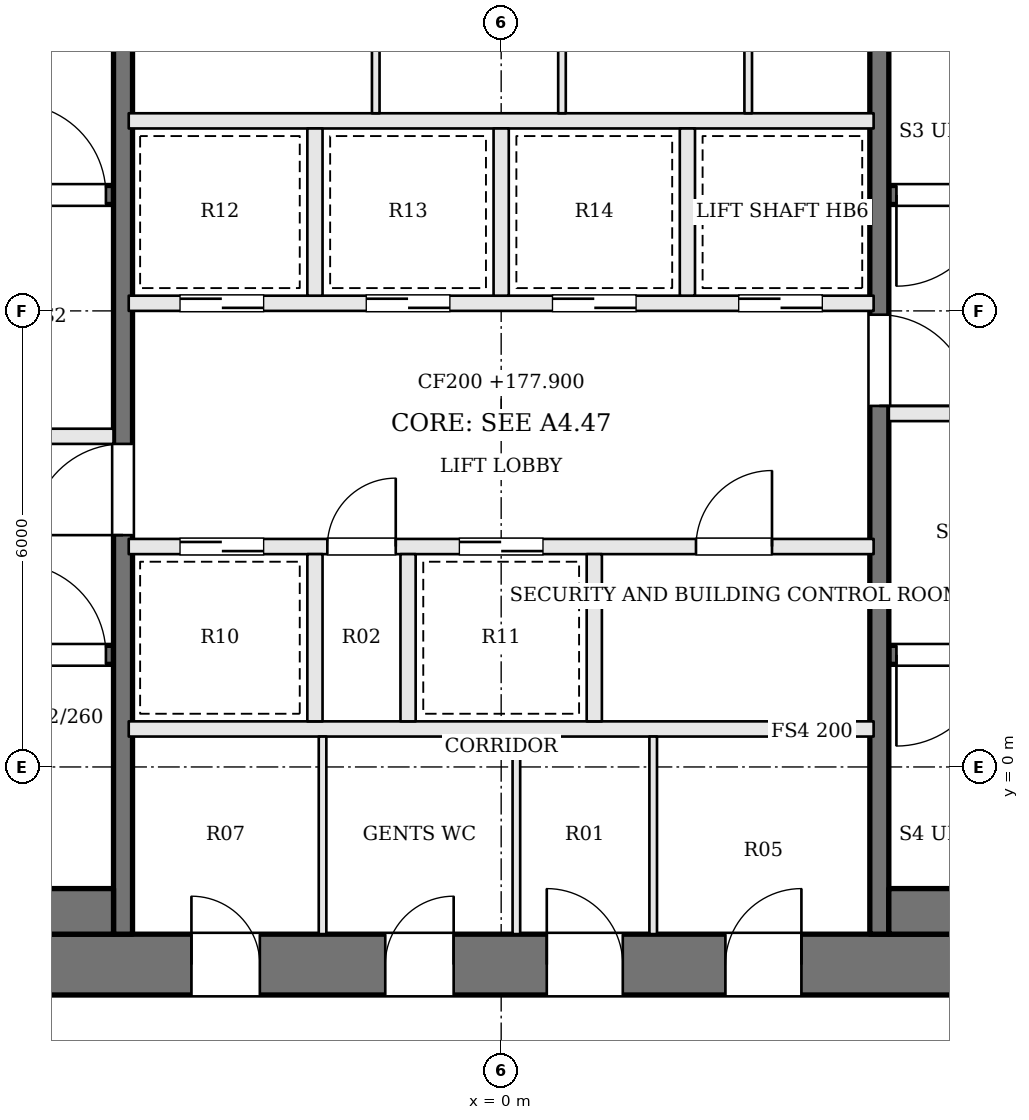
"""IFC4 building model, lengths in metres.
Left out: names, types, materials, properties, quantities, classifications, styles, units other than length and angle.
Written with IfcOpenShell. Run it as: python <this file> out.ifc"""

import sys

from ifc_helpers import new_model, si_unit, direction, frame, frame_2d, origin, place, context, subcontext, project, spatial, rectangle, extrude, element, fill, save


model = new_model("IFC4")
c1 = context("Model", 3, precision=1e-05, world=origin(), true_north=direction((0.0, 1.0)))
c2 = subcontext(c1, "Body", "Model", "MODEL_VIEW")
j1 = project(units=[si_unit("LENGTHUNIT", "METRE"), si_unit("PLANEANGLEUNIT", "RADIAN")], contexts=[c1])
p1 = place(None, origin())
s1 = spatial("IfcSite", under=j1, at=p1, CompositionType="ELEMENT")
p2 = place(p1, origin())
s2 = spatial("IfcBuilding", under=s1, at=p2, CompositionType="ELEMENT")
p3 = place(p2, frame((0.0, 0.0, 177.9)))
s3 = spatial("IfcBuildingStorey", under=s2, at=p3, CompositionType="ELEMENT", Elevation=177.9)
p4 = place(p3, frame((-13.0, -2.6, 0.0), z_axis=(0.0, 0.0, 1.0), x_axis=(1.0, 0.0, 0.0)))
e1 = element("IfcWall", 1, at=p4, inside=s3, PredefinedType="SHEAR", context=c2, shape_type="SweptSolid", body=[
    extrude(rectangle(XDim=26.0, YDim=0.8, at=frame_2d((13.0, 0.0))), origin(), (0.0, 0.0, 1.0), 3.9),
])
p5 = place(p4, frame((8.925, 0.0, 0.0)))
e2 = element("IfcOpeningElement", 2, at=p5, cuts=e1, PredefinedType="OPENING", context=c2, shape_type="SweptSolid", body=[
    extrude(rectangle(XDim=0.9, YDim=2.1, at=frame_2d((0.45, 1.05))), frame((0.0, 0.41, 0.0), z_axis=(0.0, -1.0, 0.0), x_axis=(1.0, 0.0, 0.0)), (0.0, 0.0, 1.0), 0.82),
])
p6 = place(p4, frame((11.475, 0.0, 0.0)))
e3 = element("IfcOpeningElement", 3, at=p6, cuts=e1, PredefinedType="OPENING", context=c2, shape_type="SweptSolid", body=[
    extrude(rectangle(XDim=0.9, YDim=2.1, at=frame_2d((0.45, 1.05))), frame((0.0, 0.41, 0.0), z_axis=(0.0, -1.0, 0.0), x_axis=(1.0, 0.0, 0.0)), (0.0, 0.0, 1.0), 0.82),
])
p7 = place(p4, frame((13.6, 0.0, 0.0)))
e4 = element("IfcOpeningElement", 4, at=p7, cuts=e1, PredefinedType="OPENING", context=c2, shape_type="SweptSolid", body=[
    extrude(rectangle(XDim=1.0, YDim=2.1, at=frame_2d((0.5, 1.05))), frame((0.0, 0.41, 0.0), z_axis=(0.0, -1.0, 0.0), x_axis=(1.0, 0.0, 0.0)), (0.0, 0.0, 1.0), 0.82),
])
p8 = place(p4, frame((15.95, 0.0, 0.0)))
e5 = element("IfcOpeningElement", 5, at=p8, cuts=e1, PredefinedType="OPENING", context=c2, shape_type="SweptSolid", body=[
    extrude(rectangle(XDim=1.0, YDim=2.1, at=frame_2d((0.5, 1.05))), frame((0.0, 0.41, 0.0), z_axis=(0.0, -1.0, 0.0), x_axis=(1.0, 0.0, 0.0)), (0.0, 0.0, 1.0), 0.82),
])
p9 = place(p3, frame((-12.2, 1.475, 0.0), z_axis=(0.0, 0.0, 1.0), x_axis=(1.0, 0.0, 0.0)))
e6 = element("IfcWall", 6, at=p9, inside=s3, PredefinedType="SOLIDWALL", context=c2, shape_type="SweptSolid", body=[
    extrude(rectangle(XDim=7.1, YDim=0.25, at=frame_2d((3.55, 0.0))), origin(), (0.0, 0.0, 1.0), 3.7),
])
p10 = place(p9, frame((5.8, 0.0, 0.0)))
e7 = element("IfcOpeningElement", 7, at=p10, cuts=e6, PredefinedType="OPENING", context=c2, shape_type="SweptSolid", body=[
    extrude(rectangle(XDim=1.2, YDim=2.1, at=frame_2d((0.6, 1.05))), frame((0.0, 0.135, 0.0), z_axis=(0.0, -1.0, 0.0), x_axis=(1.0, 0.0, 0.0)), (0.0, 0.0, 1.0), 0.27),
])
p11 = place(p3, frame((12.2, 7.525, 0.0), z_axis=(0.0, 0.0, 1.0), x_axis=(-1.0, 0.0, 0.0)))
e8 = element("IfcWall", 8, at=p11, inside=s3, PredefinedType="SOLIDWALL", context=c2, shape_type="SweptSolid", body=[
    extrude(rectangle(XDim=7.1, YDim=0.25, at=frame_2d((3.55, 0.0))), origin(), (0.0, 0.0, 1.0), 3.7),
])
p12 = place(p11, frame((5.8, 0.0, 0.0)))
e9 = element("IfcOpeningElement", 9, at=p12, cuts=e8, PredefinedType="OPENING", context=c2, shape_type="SweptSolid", body=[
    extrude(rectangle(XDim=1.2, YDim=2.1, at=frame_2d((0.6, 1.05))), frame((0.0, 0.135, 0.0), z_axis=(0.0, -1.0, 0.0), x_axis=(1.0, 0.0, 0.0)), (0.0, 0.0, 1.0), 0.27),
])
p13 = place(p3, frame((-12.2, 4.35, 0.0), z_axis=(0.0, 0.0, 1.0), x_axis=(1.0, 0.0, 0.0)))
e10 = element("IfcWall", 10, at=p13, inside=s3, PredefinedType="SOLIDWALL", context=c2, shape_type="SweptSolid", body=[
    extrude(rectangle(XDim=7.1, YDim=0.2, at=frame_2d((3.55, 0.0))), origin(), (0.0, 0.0, 1.0), 3.7),
])
p14 = place(p13, frame((4.4, 0.0, 0.0)))
e11 = element("IfcOpeningElement", 11, at=p14, cuts=e10, PredefinedType="OPENING", context=c2, shape_type="SweptSolid", body=[
    extrude(rectangle(XDim=1.2, YDim=2.1, at=frame_2d((0.6, 1.05))), frame((0.0, 0.11, 0.0), z_axis=(0.0, -1.0, 0.0), x_axis=(1.0, 0.0, 0.0)), (0.0, 0.0, 1.0), 0.22),
])
p15 = place(p13, frame((1.1, 0.0, 0.0)))
e12 = element("IfcOpeningElement", 12, at=p15, cuts=e10, PredefinedType="OPENING", context=c2, shape_type="SweptSolid", body=[
    extrude(rectangle(XDim=1.2, YDim=2.1, at=frame_2d((0.6, 1.05))), frame((0.0, 0.11, 0.0), z_axis=(0.0, -1.0, 0.0), x_axis=(1.0, 0.0, 0.0)), (0.0, 0.0, 1.0), 0.22),
])
p16 = place(p3, frame((12.2, 4.65, 0.0), z_axis=(0.0, 0.0, 1.0), x_axis=(-1.0, 0.0, 0.0)))
e13 = element("IfcWall", 13, at=p16, inside=s3, PredefinedType="SOLIDWALL", context=c2, shape_type="SweptSolid", body=[
    extrude(rectangle(XDim=7.1, YDim=0.2, at=frame_2d((3.55, 0.0))), origin(), (0.0, 0.0, 1.0), 3.7),
])
p17 = place(p16, frame((4.4, 0.0, 0.0)))
e14 = element("IfcOpeningElement", 14, at=p17, cuts=e13, PredefinedType="OPENING", context=c2, shape_type="SweptSolid", body=[
    extrude(rectangle(XDim=1.2, YDim=2.1, at=frame_2d((0.6, 1.05))), frame((0.0, 0.11, 0.0), z_axis=(0.0, -1.0, 0.0), x_axis=(1.0, 0.0, 0.0)), (0.0, 0.0, 1.0), 0.22),
])
p18 = place(p16, frame((1.1, 0.0, 0.0)))
e15 = element("IfcOpeningElement", 15, at=p18, cuts=e13, PredefinedType="OPENING", context=c2, shape_type="SweptSolid", body=[
    extrude(rectangle(XDim=1.2, YDim=2.1, at=frame_2d((0.6, 1.05))), frame((0.0, 0.11, 0.0), z_axis=(0.0, -1.0, 0.0), x_axis=(1.0, 0.0, 0.0)), (0.0, 0.0, 1.0), 0.22),
])
p19 = place(p3, frame((-12.2, 7.525, 0.0), z_axis=(0.0, 0.0, 1.0), x_axis=(1.0, 0.0, 0.0)))
e16 = element("IfcWall", 16, at=p19, inside=s3, PredefinedType="SOLIDWALL", context=c2, shape_type="SweptSolid", body=[
    extrude(rectangle(XDim=7.1, YDim=0.25, at=frame_2d((3.55, 0.0))), origin(), (0.0, 0.0, 1.0), 3.7),
])
p20 = place(p19, frame((5.8, 0.0, 0.0)))
e17 = element("IfcOpeningElement", 17, at=p20, cuts=e16, PredefinedType="OPENING", context=c2, shape_type="SweptSolid", body=[
    extrude(rectangle(XDim=1.2, YDim=2.1, at=frame_2d((0.6, 1.05))), frame((0.0, 0.135, 0.0), z_axis=(0.0, -1.0, 0.0), x_axis=(1.0, 0.0, 0.0)), (0.0, 0.0, 1.0), 0.27),
])
p21 = place(p3, frame((12.2, 1.475, 0.0), z_axis=(0.0, 0.0, 1.0), x_axis=(-1.0, 0.0, 0.0)))
e18 = element("IfcWall", 18, at=p21, inside=s3, PredefinedType="SOLIDWALL", context=c2, shape_type="SweptSolid", body=[
    extrude(rectangle(XDim=7.1, YDim=0.25, at=frame_2d((3.55, 0.0))), origin(), (0.0, 0.0, 1.0), 3.7),
])
p22 = place(p21, frame((5.8, 0.0, 0.0)))
e19 = element("IfcOpeningElement", 19, at=p22, cuts=e18, PredefinedType="OPENING", context=c2, shape_type="SweptSolid", body=[
    extrude(rectangle(XDim=1.2, YDim=2.1, at=frame_2d((0.6, 1.05))), frame((0.0, 0.135, 0.0), z_axis=(0.0, -1.0, 0.0), x_axis=(1.0, 0.0, 0.0)), (0.0, 0.0, 1.0), 0.27),
])
p23 = place(p3, frame((-4.975, -2.2, 0.0), z_axis=(0.0, 0.0, 1.0), x_axis=(0.0, 1.0, 0.0)))
e20 = element("IfcWall", 20, at=p23, inside=s3, PredefinedType="SOLIDWALL", context=c2, shape_type="SweptSolid", body=[
    extrude(rectangle(XDim=13.4, YDim=0.25, at=frame_2d((6.7, 0.0))), origin(), (0.0, 0.0, 1.0), 3.7),
])
p24 = place(p23, frame((5.25, 0.0, 0.0)))
e21 = element("IfcOpeningElement", 21, at=p24, cuts=e20, PredefinedType="OPENING", context=c2, shape_type="SweptSolid", body=[
    extrude(rectangle(XDim=1.2, YDim=2.1, at=frame_2d((0.6, 1.05))), frame((0.0, 0.135, 0.0), z_axis=(0.0, -1.0, 0.0), x_axis=(1.0, 0.0, 0.0)), (0.0, 0.0, 1.0), 0.27),
])
p25 = place(p3, frame((4.975, 11.2, 0.0), z_axis=(0.0, 0.0, 1.0), x_axis=(0.0, -1.0, 0.0)))
e22 = element("IfcWall", 22, at=p25, inside=s3, PredefinedType="SOLIDWALL", context=c2, shape_type="SweptSolid", body=[
    extrude(rectangle(XDim=13.4, YDim=0.25, at=frame_2d((6.7, 0.0))), origin(), (0.0, 0.0, 1.0), 3.7),
])
p26 = place(p25, frame((5.25, 0.0, 0.0)))
e23 = element("IfcOpeningElement", 23, at=p26, cuts=e22, PredefinedType="OPENING", context=c2, shape_type="SweptSolid", body=[
    extrude(rectangle(XDim=1.2, YDim=2.1, at=frame_2d((0.6, 1.05))), frame((0.0, 0.135, 0.0), z_axis=(0.0, -1.0, 0.0), x_axis=(1.0, 0.0, 0.0)), (0.0, 0.0, 1.0), 0.27),
])
for number, where, z_axis, x_axis in (
    (24, (-12.2, -1.9, 0.0), (0.0, 0.0, 1.0), (1.0, 0.0, 0.0)),
    (25, (12.2, -1.9, 0.0), (0.0, 0.0, 1.0), (-1.0, 0.0, 0.0)),
):
    element("IfcWall", number, at=place(p3, frame(where, z_axis=z_axis, x_axis=x_axis)), inside=s3, PredefinedType="SOLIDWALL", context=c2, shape_type="SweptSolid", body=[
        extrude(rectangle(XDim=7.1, YDim=0.6, at=frame_2d((3.55, 0.0))), origin(), (0.0, 0.0, 1.0), 3.7),
    ])
p27 = place(p3, frame((-4.9, 0.5, 0.0), z_axis=(0.0, 0.0, 1.0), x_axis=(1.0, 0.0, 0.0)))
e26 = element("IfcWall", 26, at=p27, inside=s3, PredefinedType="SOLIDWALL", context=c2, shape_type="SweptSolid", body=[
    extrude(rectangle(XDim=9.8, YDim=0.2, at=frame_2d((4.9, 0.0))), origin(), (0.0, 0.0, 1.0), 3.7),
])
p28 = place(p3, frame((-4.9, 2.9, 0.0), z_axis=(0.0, 0.0, 1.0), x_axis=(1.0, 0.0, 0.0)))
e27 = element("IfcWall", 27, at=p28, inside=s3, PredefinedType="SOLIDWALL", context=c2, shape_type="SweptSolid", body=[
    extrude(rectangle(XDim=9.8, YDim=0.2, at=frame_2d((4.9, 0.0))), origin(), (0.0, 0.0, 1.0), 3.7),
])
p29 = place(p28, frame((0.675, 0.0, 0.0)))
e28 = element("IfcOpeningElement", 28, at=p29, cuts=e27, PredefinedType="OPENING", context=c2, shape_type="SweptSolid", body=[
    extrude(rectangle(XDim=1.1, YDim=2.1, at=frame_2d((0.55, 1.05))), frame((0.0, 0.11, 0.0), z_axis=(0.0, -1.0, 0.0), x_axis=(1.0, 0.0, 0.0)), (0.0, 0.0, 1.0), 0.22),
])
p30 = place(p28, frame((2.613, 0.0, 0.0)))
e29 = element("IfcOpeningElement", 29, at=p30, cuts=e27, PredefinedType="OPENING", context=c2, shape_type="SweptSolid", body=[
    extrude(rectangle(XDim=0.9, YDim=2.1, at=frame_2d((0.45, 1.05))), frame((0.0, 0.11, 0.0), z_axis=(0.0, -1.0, 0.0), x_axis=(1.0, 0.0, 0.0)), (0.0, 0.0, 1.0), 0.22),
])
p31 = place(p28, frame((4.35, 0.0, 0.0)))
e30 = element("IfcOpeningElement", 30, at=p31, cuts=e27, PredefinedType="OPENING", context=c2, shape_type="SweptSolid", body=[
    extrude(rectangle(XDim=1.1, YDim=2.1, at=frame_2d((0.55, 1.05))), frame((0.0, 0.11, 0.0), z_axis=(0.0, -1.0, 0.0), x_axis=(1.0, 0.0, 0.0)), (0.0, 0.0, 1.0), 0.22),
])
p32 = place(p28, frame((7.463, 0.0, 0.0)))
e31 = element("IfcOpeningElement", 31, at=p32, cuts=e27, PredefinedType="OPENING", context=c2, shape_type="SweptSolid", body=[
    extrude(rectangle(XDim=1.0, YDim=2.1, at=frame_2d((0.5, 1.05))), frame((0.0, 0.11, 0.0), z_axis=(0.0, -1.0, 0.0), x_axis=(1.0, 0.0, 0.0)), (0.0, 0.0, 1.0), 0.22),
])
p33 = place(p3, frame((-4.9, 6.1, 0.0), z_axis=(0.0, 0.0, 1.0), x_axis=(1.0, 0.0, 0.0)))
e32 = element("IfcWall", 32, at=p33, inside=s3, PredefinedType="SOLIDWALL", context=c2, shape_type="SweptSolid", body=[
    extrude(rectangle(XDim=9.8, YDim=0.2, at=frame_2d((4.9, 0.0))), origin(), (0.0, 0.0, 1.0), 3.7),
])
p34 = place(p33, frame((0.675, 0.0, 0.0)))
e33 = element("IfcOpeningElement", 33, at=p34, cuts=e32, PredefinedType="OPENING", context=c2, shape_type="SweptSolid", body=[
    extrude(rectangle(XDim=1.1, YDim=2.1, at=frame_2d((0.55, 1.05))), frame((0.0, 0.11, 0.0), z_axis=(0.0, -1.0, 0.0), x_axis=(1.0, 0.0, 0.0)), (0.0, 0.0, 1.0), 0.22),
])
p35 = place(p33, frame((3.125, 0.0, 0.0)))
e34 = element("IfcOpeningElement", 34, at=p35, cuts=e32, PredefinedType="OPENING", context=c2, shape_type="SweptSolid", body=[
    extrude(rectangle(XDim=1.1, YDim=2.1, at=frame_2d((0.55, 1.05))), frame((0.0, 0.11, 0.0), z_axis=(0.0, -1.0, 0.0), x_axis=(1.0, 0.0, 0.0)), (0.0, 0.0, 1.0), 0.22),
])
p36 = place(p33, frame((5.575, 0.0, 0.0)))
e35 = element("IfcOpeningElement", 35, at=p36, cuts=e32, PredefinedType="OPENING", context=c2, shape_type="SweptSolid", body=[
    extrude(rectangle(XDim=1.1, YDim=2.1, at=frame_2d((0.55, 1.05))), frame((0.0, 0.11, 0.0), z_axis=(0.0, -1.0, 0.0), x_axis=(1.0, 0.0, 0.0)), (0.0, 0.0, 1.0), 0.22),
])
p37 = place(p33, frame((8.025, 0.0, 0.0)))
e36 = element("IfcOpeningElement", 36, at=p37, cuts=e32, PredefinedType="OPENING", context=c2, shape_type="SweptSolid", body=[
    extrude(rectangle(XDim=1.1, YDim=2.1, at=frame_2d((0.55, 1.05))), frame((0.0, 0.11, 0.0), z_axis=(0.0, -1.0, 0.0), x_axis=(1.0, 0.0, 0.0)), (0.0, 0.0, 1.0), 0.22),
])
p38 = place(p3, frame((-4.9, 8.5, 0.0), z_axis=(0.0, 0.0, 1.0), x_axis=(1.0, 0.0, 0.0)))
e37 = element("IfcWall", 37, at=p38, inside=s3, PredefinedType="SOLIDWALL", context=c2, shape_type="SweptSolid", body=[
    extrude(rectangle(XDim=9.8, YDim=0.2, at=frame_2d((4.9, 0.0))), origin(), (0.0, 0.0, 1.0), 3.7),
])
for number, where, z_axis, x_axis in (
    (38, (-2.45, 0.6, 0.0), (0.0, 0.0, 1.0), (0.0, 1.0, 0.0)),
    (39, (-1.225, 0.6, 0.0), (0.0, 0.0, 1.0), (0.0, 1.0, 0.0)),
    (40, (1.225, 0.6, 0.0), (0.0, 0.0, 1.0), (0.0, 1.0, 0.0)),
    (41, (-2.45, 6.2, 0.0), (0.0, 0.0, 1.0), (0.0, 1.0, 0.0)),
    (42, (0.0, 6.2, 0.0), (0.0, 0.0, 1.0), (0.0, 1.0, 0.0)),
    (43, (2.45, 6.2, 0.0), (0.0, 0.0, 1.0), (0.0, 1.0, 0.0)),
):
    element("IfcWall", number, at=place(p3, frame(where, z_axis=z_axis, x_axis=x_axis)), inside=s3, PredefinedType="SOLIDWALL", context=c2, shape_type="SweptSolid", body=[
        extrude(rectangle(XDim=2.2, YDim=0.2, at=frame_2d((1.1, 0.0))), origin(), (0.0, 0.0, 1.0), 3.7),
    ])
for number, where, z_axis, x_axis in (
    (44, (-2.35, -2.2, 0.0), (0.0, 0.0, 1.0), (0.0, 1.0, 0.0)),
    (45, (0.2, -2.2, 0.0), (0.0, 0.0, 1.0), (0.0, 1.0, 0.0)),
    (46, (2.0, -2.2, 0.0), (0.0, 0.0, 1.0), (0.0, 1.0, 0.0)),
    (47, (-1.65, 8.6, 0.0), (0.0, 0.0, 1.0), (0.0, 1.0, 0.0)),
    (48, (0.8, 8.6, 0.0), (0.0, 0.0, 1.0), (0.0, 1.0, 0.0)),
    (49, (3.25, 8.6, 0.0), (0.0, 0.0, 1.0), (0.0, 1.0, 0.0)),
):
    element("IfcWall", number, at=place(p3, frame(where, z_axis=z_axis, x_axis=x_axis)), inside=s3, PredefinedType="PARTITIONING", context=c2, shape_type="SweptSolid", body=[
        extrude(rectangle(XDim=2.6, YDim=0.1, at=frame_2d((1.3, 0.0))), origin(), (0.0, 0.0, 1.0), 3.7),
    ])
p39 = place(p24, origin())
e50 = element("IfcDoor", 50, at=p39, inside=s3, OperationType="SINGLE_SWING_LEFT", PredefinedType="DOOR", context=c2, shape_type="SweptSolid", body=[
    extrude(rectangle(XDim=1.2, YDim=2.1, at=frame_2d((0.6, 1.05))), frame((0.0, 0.025, 0.0), z_axis=(0.0, -1.0, 0.0), x_axis=(1.0, 0.0, 0.0)), (0.0, 0.0, 1.0), 0.05),
])
fill(e21, e50)
p40 = place(p26, origin())
e51 = element("IfcDoor", 51, at=p40, inside=s3, OperationType="SINGLE_SWING_RIGHT", PredefinedType="DOOR", context=c2, shape_type="SweptSolid", body=[
    extrude(rectangle(XDim=1.2, YDim=2.1, at=frame_2d((0.6, 1.05))), frame((0.0, 0.025, 0.0), z_axis=(0.0, -1.0, 0.0), x_axis=(1.0, 0.0, 0.0)), (0.0, 0.0, 1.0), 0.05),
])
fill(e23, e51)
p41 = place(p10, origin())
e52 = element("IfcDoor", 52, at=p41, inside=s3, OperationType="SINGLE_SWING_LEFT", PredefinedType="DOOR", context=c2, shape_type="SweptSolid", body=[
    extrude(rectangle(XDim=1.2, YDim=2.1, at=frame_2d((0.6, 1.05))), frame((0.0, 0.025, 0.0), z_axis=(0.0, -1.0, 0.0), x_axis=(1.0, 0.0, 0.0)), (0.0, 0.0, 1.0), 0.05),
])
fill(e7, e52)
p42 = place(p12, origin())
e53 = element("IfcDoor", 53, at=p42, inside=s3, OperationType="SINGLE_SWING_RIGHT", PredefinedType="DOOR", context=c2, shape_type="SweptSolid", body=[
    extrude(rectangle(XDim=1.2, YDim=2.1, at=frame_2d((0.6, 1.05))), frame((0.0, 0.025, 0.0), z_axis=(0.0, -1.0, 0.0), x_axis=(1.0, 0.0, 0.0)), (0.0, 0.0, 1.0), 0.05),
])
fill(e9, e53)
p43 = place(p20, origin())
e54 = element("IfcDoor", 54, at=p43, inside=s3, OperationType="SINGLE_SWING_LEFT", PredefinedType="DOOR", context=c2, shape_type="SweptSolid", body=[
    extrude(rectangle(XDim=1.2, YDim=2.1, at=frame_2d((0.6, 1.05))), frame((0.0, 0.025, 0.0), z_axis=(0.0, -1.0, 0.0), x_axis=(1.0, 0.0, 0.0)), (0.0, 0.0, 1.0), 0.05),
])
fill(e17, e54)
p44 = place(p22, origin())
e55 = element("IfcDoor", 55, at=p44, inside=s3, OperationType="SINGLE_SWING_RIGHT", PredefinedType="DOOR", context=c2, shape_type="SweptSolid", body=[
    extrude(rectangle(XDim=1.2, YDim=2.1, at=frame_2d((0.6, 1.05))), frame((0.0, 0.025, 0.0), z_axis=(0.0, -1.0, 0.0), x_axis=(1.0, 0.0, 0.0)), (0.0, 0.0, 1.0), 0.05),
])
fill(e19, e55)
p45 = place(p29, origin())
e56 = element("IfcDoor", 56, at=p45, inside=s3, OperationType="SLIDING_TO_RIGHT", PredefinedType="DOOR", context=c2, shape_type="SweptSolid", body=[
    extrude(rectangle(XDim=1.1, YDim=2.1, at=frame_2d((0.55, 1.05))), frame((0.0, 0.025, 0.0), z_axis=(0.0, -1.0, 0.0), x_axis=(1.0, 0.0, 0.0)), (0.0, 0.0, 1.0), 0.05),
])
fill(e28, e56)
p46 = place(p30, origin())
e57 = element("IfcDoor", 57, at=p46, inside=s3, OperationType="SINGLE_SWING_RIGHT", PredefinedType="DOOR", context=c2, shape_type="SweptSolid", body=[
    extrude(rectangle(XDim=0.9, YDim=2.1, at=frame_2d((0.45, 1.05))), frame((0.0, 0.025, 0.0), z_axis=(0.0, -1.0, 0.0), x_axis=(1.0, 0.0, 0.0)), (0.0, 0.0, 1.0), 0.05),
])
fill(e29, e57)
p47 = place(p31, origin())
e58 = element("IfcDoor", 58, at=p47, inside=s3, OperationType="SLIDING_TO_LEFT", PredefinedType="DOOR", context=c2, shape_type="SweptSolid", body=[
    extrude(rectangle(XDim=1.1, YDim=2.1, at=frame_2d((0.55, 1.05))), frame((0.0, 0.025, 0.0), z_axis=(0.0, -1.0, 0.0), x_axis=(1.0, 0.0, 0.0)), (0.0, 0.0, 1.0), 0.05),
])
fill(e30, e58)
p48 = place(p32, origin())
e59 = element("IfcDoor", 59, at=p48, inside=s3, OperationType="SINGLE_SWING_RIGHT", PredefinedType="DOOR", context=c2, shape_type="SweptSolid", body=[
    extrude(rectangle(XDim=1.0, YDim=2.1, at=frame_2d((0.5, 1.05))), frame((0.0, 0.025, 0.0), z_axis=(0.0, -1.0, 0.0), x_axis=(1.0, 0.0, 0.0)), (0.0, 0.0, 1.0), 0.05),
])
fill(e31, e59)
p49 = place(p34, origin())
e60 = element("IfcDoor", 60, at=p49, inside=s3, OperationType="SLIDING_TO_RIGHT", PredefinedType="DOOR", context=c2, shape_type="SweptSolid", body=[
    extrude(rectangle(XDim=1.1, YDim=2.1, at=frame_2d((0.55, 1.05))), frame((0.0, 0.025, 0.0), z_axis=(0.0, -1.0, 0.0), x_axis=(1.0, 0.0, 0.0)), (0.0, 0.0, 1.0), 0.05),
])
fill(e33, e60)
p50 = place(p35, origin())
e61 = element("IfcDoor", 61, at=p50, inside=s3, OperationType="SLIDING_TO_LEFT", PredefinedType="DOOR", context=c2, shape_type="SweptSolid", body=[
    extrude(rectangle(XDim=1.1, YDim=2.1, at=frame_2d((0.55, 1.05))), frame((0.0, 0.025, 0.0), z_axis=(0.0, -1.0, 0.0), x_axis=(1.0, 0.0, 0.0)), (0.0, 0.0, 1.0), 0.05),
])
fill(e34, e61)
p51 = place(p36, origin())
e62 = element("IfcDoor", 62, at=p51, inside=s3, OperationType="SLIDING_TO_RIGHT", PredefinedType="DOOR", context=c2, shape_type="SweptSolid", body=[
    extrude(rectangle(XDim=1.1, YDim=2.1, at=frame_2d((0.55, 1.05))), frame((0.0, 0.025, 0.0), z_axis=(0.0, -1.0, 0.0), x_axis=(1.0, 0.0, 0.0)), (0.0, 0.0, 1.0), 0.05),
])
fill(e35, e62)
p52 = place(p37, origin())
e63 = element("IfcDoor", 63, at=p52, inside=s3, OperationType="SLIDING_TO_LEFT", PredefinedType="DOOR", context=c2, shape_type="SweptSolid", body=[
    extrude(rectangle(XDim=1.1, YDim=2.1, at=frame_2d((0.55, 1.05))), frame((0.0, 0.025, 0.0), z_axis=(0.0, -1.0, 0.0), x_axis=(1.0, 0.0, 0.0)), (0.0, 0.0, 1.0), 0.05),
])
fill(e36, e63)
p53 = place(p5, origin())
e64 = element("IfcDoor", 64, at=p53, inside=s3, OperationType="SINGLE_SWING_LEFT", PredefinedType="DOOR", context=c2, shape_type="SweptSolid", body=[
    extrude(rectangle(XDim=0.9, YDim=2.1, at=frame_2d((0.45, 1.05))), frame((0.0, 0.025, 0.0), z_axis=(0.0, -1.0, 0.0), x_axis=(1.0, 0.0, 0.0)), (0.0, 0.0, 1.0), 0.05),
])
fill(e2, e64)
p54 = place(p6, origin())
e65 = element("IfcDoor", 65, at=p54, inside=s3, OperationType="SINGLE_SWING_RIGHT", PredefinedType="DOOR", context=c2, shape_type="SweptSolid", body=[
    extrude(rectangle(XDim=0.9, YDim=2.1, at=frame_2d((0.45, 1.05))), frame((0.0, 0.025, 0.0), z_axis=(0.0, -1.0, 0.0), x_axis=(1.0, 0.0, 0.0)), (0.0, 0.0, 1.0), 0.05),
])
fill(e3, e65)
p55 = place(p7, origin())
e66 = element("IfcDoor", 66, at=p55, inside=s3, OperationType="SINGLE_SWING_LEFT", PredefinedType="DOOR", context=c2, shape_type="SweptSolid", body=[
    extrude(rectangle(XDim=1.0, YDim=2.1, at=frame_2d((0.5, 1.05))), frame((0.0, 0.025, 0.0), z_axis=(0.0, -1.0, 0.0), x_axis=(1.0, 0.0, 0.0)), (0.0, 0.0, 1.0), 0.05),
])
fill(e4, e66)
p56 = place(p8, origin())
e67 = element("IfcDoor", 67, at=p56, inside=s3, OperationType="SINGLE_SWING_RIGHT", PredefinedType="DOOR", context=c2, shape_type="SweptSolid", body=[
    extrude(rectangle(XDim=1.0, YDim=2.1, at=frame_2d((0.5, 1.05))), frame((0.0, 0.025, 0.0), z_axis=(0.0, -1.0, 0.0), x_axis=(1.0, 0.0, 0.0)), (0.0, 0.0, 1.0), 0.05),
])
fill(e5, e67)
save(model, sys.argv[1])
